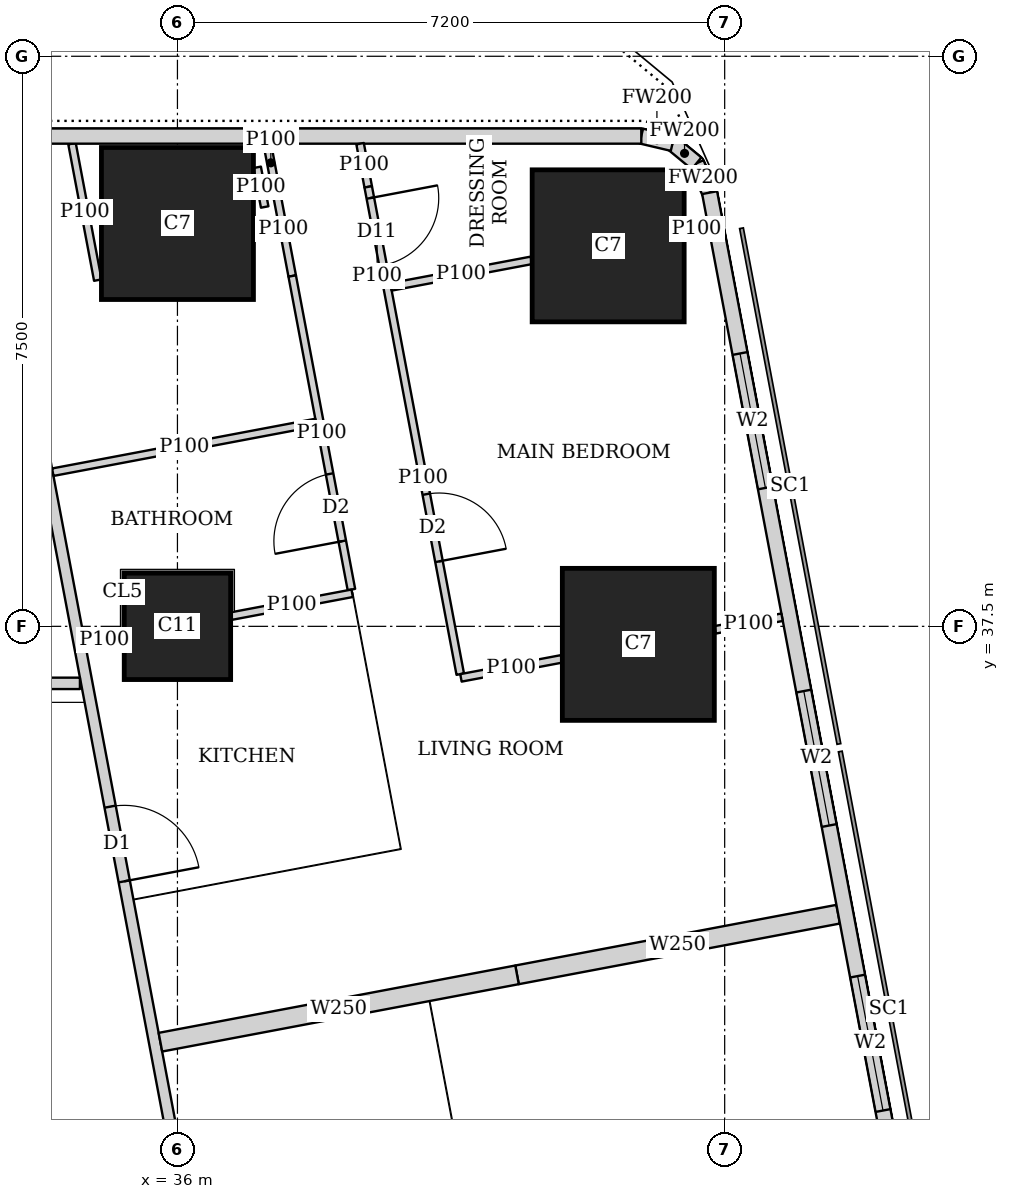
"""IFC4 building model, lengths in metres.
Left out: names, types, materials, properties, quantities, classifications, styles, units other than length and angle.
Written with IfcOpenShell. Run it as: python <this file> out.ifc"""

import sys

from ifc_helpers import new_model, si_unit, direction, frame, frame_2d, origin, origin_2d, place, context, subcontext, project, spatial, rectangle, extrude, element, fill, save


model = new_model("IFC4")
c1 = context("Model", 3, precision=1e-05, world=origin(), true_north=direction((0.0, 1.0)))
c2 = subcontext(c1, "Body", "Model", "MODEL_VIEW")
j1 = project(units=[si_unit("LENGTHUNIT", "METRE"), si_unit("PLANEANGLEUNIT", "RADIAN")], contexts=[c1])
p1 = place(None, origin())
s1 = spatial("IfcSite", under=j1, at=p1, CompositionType="ELEMENT")
p2 = place(p1, origin())
s2 = spatial("IfcBuilding", under=s1, at=p2, CompositionType="ELEMENT")
p3 = place(p2, frame((0.0, 0.0, 251.6)))
s3 = spatial("IfcBuildingStorey", under=s2, at=p3, CompositionType="ELEMENT", Elevation=251.6)
p4 = place(p3, frame((36.0, 37.5, 0.0), z_axis=(0.0, 0.0, 1.0), x_axis=(1.0, 0.0, 0.0)))
e1 = element("IfcColumn", 1, at=p4, inside=s3, PredefinedType="COLUMN", context=c2, shape_type="SweptSolid", body=[
    extrude(rectangle(XDim=1.4, YDim=1.4, at=origin_2d()), origin(), (0.0, 0.0, 1.0), 3.75),
])
p5 = place(p3, frame((42.064, 37.263, 0.0), z_axis=(0.0, 0.0, 1.0), x_axis=(1.0, 0.0, 0.0)))
e2 = element("IfcColumn", 2, at=p5, inside=s3, PredefinedType="COLUMN", context=c2, shape_type="SweptSolid", body=[
    extrude(rectangle(XDim=2.0, YDim=2.0, at=origin_2d()), origin(), (0.0, 0.0, 1.0), 3.75),
])
for number, where, z_axis, x_axis in (
    (3, (36.0, 42.8, -0.25), (0.0, 0.0, 1.0), (1.0, 0.0, 0.0)),
    (4, (41.667, 42.506, -0.25), (0.0, 0.0, 1.0), (1.0, 0.0, 0.0)),
):
    element("IfcColumn", number, at=place(p3, frame(where, z_axis=z_axis, x_axis=x_axis)), inside=s3, PredefinedType="COLUMN", context=c2, shape_type="SweptSolid", body=[
        extrude(rectangle(XDim=2.0, YDim=2.0, at=origin_2d()), origin(), (0.0, 0.0, 1.0), 4.0),
    ])
p6 = place(p3, frame((49.684, 7.832, 0.0), z_axis=(0.0, 0.0, 1.0), x_axis=(-0.185616669694, 0.982622232565, 0.0)))
e5 = element("IfcWall", 5, at=p6, inside=s3, PredefinedType="SOLIDWALL", context=c2, shape_type="SweptSolid", body=[
    extrude(rectangle(XDim=36.0, YDim=0.2, at=frame_2d((18.0, 0.0))), origin(), (0.0, 0.0, 1.0), 3.5),
])
p7 = place(p6, frame((2.518, 0.0, 0.9)))
e6 = element("IfcOpeningElement", 6, at=p7, cuts=e5, PredefinedType="OPENING", context=c2, shape_type="SweptSolid", body=[
    extrude(rectangle(XDim=2.4, YDim=1.5, at=frame_2d((1.2, 0.75))), frame((0.0, 0.11, 0.0), z_axis=(0.0, -1.0, 0.0), x_axis=(1.0, 0.0, 0.0)), (0.0, 0.0, 1.0), 0.22),
])
p8 = place(p6, frame((8.444, 0.0, 0.9)))
e7 = element("IfcOpeningElement", 7, at=p8, cuts=e5, PredefinedType="OPENING", context=c2, shape_type="SweptSolid", body=[
    extrude(rectangle(XDim=1.8, YDim=1.5, at=frame_2d((0.9, 0.75))), frame((0.0, 0.11, 0.0), z_axis=(0.0, -1.0, 0.0), x_axis=(1.0, 0.0, 0.0)), (0.0, 0.0, 1.0), 0.22),
])
p9 = place(p6, frame((12.261, 0.0, 0.9)))
e8 = element("IfcOpeningElement", 8, at=p9, cuts=e5, PredefinedType="OPENING", context=c2, shape_type="SweptSolid", body=[
    extrude(rectangle(XDim=1.8, YDim=1.5, at=frame_2d((0.9, 0.75))), frame((0.0, 0.11, 0.0), z_axis=(0.0, -1.0, 0.0), x_axis=(1.0, 0.0, 0.0)), (0.0, 0.0, 1.0), 0.22),
])
p10 = place(p6, frame((16.078, 0.0, 0.9)))
e9 = element("IfcOpeningElement", 9, at=p10, cuts=e5, PredefinedType="OPENING", context=c2, shape_type="SweptSolid", body=[
    extrude(rectangle(XDim=1.8, YDim=1.5, at=frame_2d((0.9, 0.75))), frame((0.0, 0.11, 0.0), z_axis=(0.0, -1.0, 0.0), x_axis=(1.0, 0.0, 0.0)), (0.0, 0.0, 1.0), 0.22),
])
p11 = place(p6, frame((19.894, 0.0, 0.9)))
e10 = element("IfcOpeningElement", 10, at=p11, cuts=e5, PredefinedType="OPENING", context=c2, shape_type="SweptSolid", body=[
    extrude(rectangle(XDim=1.8, YDim=1.5, at=frame_2d((0.9, 0.75))), frame((0.0, 0.11, 0.0), z_axis=(0.0, -1.0, 0.0), x_axis=(1.0, 0.0, 0.0)), (0.0, 0.0, 1.0), 0.22),
])
p12 = place(p6, frame((23.71, 0.0, 0.9)))
e11 = element("IfcOpeningElement", 11, at=p12, cuts=e5, PredefinedType="OPENING", context=c2, shape_type="SweptSolid", body=[
    extrude(rectangle(XDim=1.8, YDim=1.5, at=frame_2d((0.9, 0.75))), frame((0.0, 0.11, 0.0), z_axis=(0.0, -1.0, 0.0), x_axis=(1.0, 0.0, 0.0)), (0.0, 0.0, 1.0), 0.22),
])
p13 = place(p6, frame((27.526, 0.0, 0.9)))
e12 = element("IfcOpeningElement", 12, at=p13, cuts=e5, PredefinedType="OPENING", context=c2, shape_type="SweptSolid", body=[
    extrude(rectangle(XDim=1.8, YDim=1.5, at=frame_2d((0.9, 0.75))), frame((0.0, 0.11, 0.0), z_axis=(0.0, -1.0, 0.0), x_axis=(1.0, 0.0, 0.0)), (0.0, 0.0, 1.0), 0.22),
])
p14 = place(p6, frame((32.046, 0.0, 0.9)))
e13 = element("IfcOpeningElement", 13, at=p14, cuts=e5, PredefinedType="OPENING", context=c2, shape_type="SweptSolid", body=[
    extrude(rectangle(XDim=1.8, YDim=1.5, at=frame_2d((0.9, 0.75))), frame((0.0, 0.11, 0.0), z_axis=(0.0, -1.0, 0.0), x_axis=(1.0, 0.0, 0.0)), (0.0, 0.0, 1.0), 0.22),
])
p15 = place(p3, frame((43.002, 43.206, 0.0), z_axis=(0.0, 0.0, 1.0), x_axis=(-0.40678170573, 0.913525393124, 0.0)))
e14 = element("IfcWall", 14, at=p15, inside=s3, PredefinedType="SOLIDWALL", context=c2, shape_type="SweptSolid", body=[
    extrude(rectangle(XDim=0.423, YDim=0.2, at=frame_2d((0.211, 0.0))), origin(), (0.0, 0.0, 1.0), 3.5),
])
p16 = place(p3, frame((42.83, 43.592, 0.0), z_axis=(0.0, 0.0, 1.0), x_axis=(-0.771190539797, 0.636604391539, 0.0)))
e15 = element("IfcWall", 15, at=p16, inside=s3, PredefinedType="SOLIDWALL", context=c2, shape_type="SweptSolid", body=[
    extrude(rectangle(XDim=0.41, YDim=0.2, at=frame_2d((0.205, 0.0))), origin(), (0.0, 0.0, 1.0), 3.5),
])
p17 = place(p3, frame((42.514, 43.853, 0.0), z_axis=(0.0, 0.0, 1.0), x_axis=(-0.973288080424, 0.229587265555, 0.0)))
e16 = element("IfcWall", 16, at=p17, inside=s3, PredefinedType="SOLIDWALL", context=c2, shape_type="SweptSolid", body=[
    extrude(rectangle(XDim=0.422, YDim=0.2, at=frame_2d((0.211, 0.0))), origin(), (0.0, 0.0, 1.0), 3.5),
])
p18 = place(p3, frame((42.103, 43.95, 0.0), z_axis=(0.0, 0.0, 1.0), x_axis=(-1.0, 0.0, 0.0)))
e17 = element("IfcWall", 17, at=p18, inside=s3, PredefinedType="SOLIDWALL", context=c2, shape_type="SweptSolid", body=[
    extrude(rectangle(XDim=27.54, YDim=0.2, at=frame_2d((13.77, 0.0))), origin(), (0.0, 0.0, 1.0), 3.5),
])
p19 = place(p18, frame((10.603, 0.0, 0.9)))
e18 = element("IfcOpeningElement", 18, at=p19, cuts=e17, PredefinedType="OPENING", context=c2, shape_type="SweptSolid", body=[
    extrude(rectangle(XDim=1.8, YDim=1.5, at=frame_2d((0.9, 0.75))), frame((0.0, 0.11, 0.0), z_axis=(0.0, -1.0, 0.0), x_axis=(1.0, 0.0, 0.0)), (0.0, 0.0, 1.0), 0.22),
])
p20 = place(p18, frame((14.203, 0.0, 0.9)))
e19 = element("IfcOpeningElement", 19, at=p20, cuts=e17, PredefinedType="OPENING", context=c2, shape_type="SweptSolid", body=[
    extrude(rectangle(XDim=1.8, YDim=1.5, at=frame_2d((0.9, 0.75))), frame((0.0, 0.11, 0.0), z_axis=(0.0, -1.0, 0.0), x_axis=(1.0, 0.0, 0.0)), (0.0, 0.0, 1.0), 0.22),
])
p21 = place(p18, frame((17.803, 0.0, 0.9)))
e20 = element("IfcOpeningElement", 20, at=p21, cuts=e17, PredefinedType="OPENING", context=c2, shape_type="SweptSolid", body=[
    extrude(rectangle(XDim=1.8, YDim=1.5, at=frame_2d((0.9, 0.75))), frame((0.0, 0.11, 0.0), z_axis=(0.0, -1.0, 0.0), x_axis=(1.0, 0.0, 0.0)), (0.0, 0.0, 1.0), 0.22),
])
p22 = place(p18, frame((22.822, 0.0, 0.9)))
e21 = element("IfcOpeningElement", 21, at=p22, cuts=e17, PredefinedType="OPENING", context=c2, shape_type="SweptSolid", body=[
    extrude(rectangle(XDim=2.4, YDim=1.5, at=frame_2d((1.2, 0.75))), frame((0.0, 0.11, 0.0), z_axis=(0.0, -1.0, 0.0), x_axis=(1.0, 0.0, 0.0)), (0.0, 0.0, 1.0), 0.22),
])
p23 = place(p3, frame((29.501, 36.75, 0.0), z_axis=(0.0, 0.0, 1.0), x_axis=(1.0, 0.0, 0.0)))
e22 = element("IfcWall", 22, at=p23, inside=s3, PredefinedType="SOLIDWALL", context=c2, shape_type="SweptSolid", body=[
    extrude(rectangle(XDim=5.216, YDim=0.15, at=frame_2d((2.608, 0.0))), origin(), (0.0, 0.0, 1.0), 3.5),
])
p24 = place(p23, frame((1.803, 0.0, 0.0)))
e23 = element("IfcOpeningElement", 23, at=p24, cuts=e22, PredefinedType="OPENING", context=c2, shape_type="SweptSolid", body=[
    extrude(rectangle(XDim=1.0, YDim=2.1, at=frame_2d((0.5, 1.05))), frame((0.0, 0.085, 0.0), z_axis=(0.0, -1.0, 0.0), x_axis=(1.0, 0.0, 0.0)), (0.0, 0.0, 1.0), 0.17),
])
p25 = place(p3, frame((33.781, 42.186, 0.0), z_axis=(0.0, 0.0, 1.0), x_axis=(0.185593518645, -0.9826266055, 0.0)))
e24 = element("IfcWall", 24, at=p25, inside=s3, PredefinedType="SOLIDWALL", context=c2, shape_type="SweptSolid", body=[
    extrude(rectangle(XDim=35.961, YDim=0.15, at=frame_2d((17.98, 0.0))), origin(), (0.0, 0.0, 1.0), 2.5),
])
p26 = place(p25, frame((7.183, 0.0, 0.0)))
e25 = element("IfcOpeningElement", 25, at=p26, cuts=e24, PredefinedType="OPENING", context=c2, shape_type="SweptSolid", body=[
    extrude(rectangle(XDim=1.0, YDim=2.1, at=frame_2d((0.5, 1.05))), frame((0.0, 0.085, 0.0), z_axis=(0.0, -1.0, 0.0), x_axis=(1.0, 0.0, 0.0)), (0.0, 0.0, 1.0), 0.17),
])
p27 = place(p25, frame((11.76, 0.0, 0.0)))
e26 = element("IfcOpeningElement", 26, at=p27, cuts=e24, PredefinedType="OPENING", context=c2, shape_type="SweptSolid", body=[
    extrude(rectangle(XDim=1.0, YDim=2.1, at=frame_2d((0.5, 1.05))), frame((0.0, 0.085, 0.0), z_axis=(0.0, -1.0, 0.0), x_axis=(1.0, 0.0, 0.0)), (0.0, 0.0, 1.0), 0.17),
])
p28 = place(p25, frame((23.863, 0.0, 0.0)))
e27 = element("IfcOpeningElement", 27, at=p28, cuts=e24, PredefinedType="OPENING", context=c2, shape_type="SweptSolid", body=[
    extrude(rectangle(XDim=1.0, YDim=2.1, at=frame_2d((0.5, 1.05))), frame((0.0, 0.085, 0.0), z_axis=(0.0, -1.0, 0.0), x_axis=(1.0, 0.0, 0.0)), (0.0, 0.0, 1.0), 0.17),
])
p29 = place(p25, frame((30.502, 0.0, 0.0)))
e28 = element("IfcOpeningElement", 28, at=p29, cuts=e24, PredefinedType="OPENING", context=c2, shape_type="SweptSolid", body=[
    extrude(rectangle(XDim=1.0, YDim=2.1, at=frame_2d((0.5, 1.05))), frame((0.0, 0.085, 0.0), z_axis=(0.0, -1.0, 0.0), x_axis=(1.0, 0.0, 0.0)), (0.0, 0.0, 1.0), 0.17),
])
p30 = place(p3, frame((34.952, 42.055, 0.0), z_axis=(0.0, 0.0, 1.0), x_axis=(-0.185490642006, 0.98264603074, 0.0)))
e29 = element("IfcWall", 29, at=p30, inside=s3, PredefinedType="PARTITIONING", context=c2, shape_type="SweptSolid", body=[
    extrude(rectangle(XDim=1.827, YDim=0.1, at=frame_2d((0.914, 0.0))), origin(), (0.0, 0.0, 1.0), 2.05),
])
p31 = place(p3, frame((37.049, 43.539, 0.0), z_axis=(0.0, 0.0, 1.0), x_axis=(0.186119495745, -0.982527115811, 0.0)))
e30 = element("IfcWall", 30, at=p31, inside=s3, PredefinedType="PARTITIONING", context=c2, shape_type="SweptSolid", body=[
    extrude(rectangle(XDim=0.531, YDim=0.1, at=frame_2d((0.266, 0.0))), origin(), (0.0, 0.0, 1.0), 2.05),
])
p32 = place(p3, frame((38.403, 43.85, 0.0), z_axis=(0.0, 0.0, 1.0), x_axis=(0.184976954078, -0.982742858768, 0.0)))
e31 = element("IfcWall", 31, at=p32, inside=s3, PredefinedType="PARTITIONING", context=c2, shape_type="SweptSolid", body=[
    extrude(rectangle(XDim=0.578, YDim=0.1, at=frame_2d((0.289, 0.0))), origin(), (0.0, 0.0, 1.0), 3.5),
])
p33 = place(p3, frame((38.51, 43.282, 0.0), z_axis=(0.0, 0.0, 1.0), x_axis=(0.185775287495, -0.982592256511, 0.0)))
e32 = element("IfcWall", 32, at=p33, inside=s3, PredefinedType="PARTITIONING", context=c2, shape_type="SweptSolid", body=[
    extrude(rectangle(XDim=1.259, YDim=0.1, at=frame_2d((0.629, 0.0))), origin(), (0.0, 0.0, 1.0), 2.05),
])
p34 = place(p33, frame((0.15, 0.0, 0.0)))
e33 = element("IfcOpeningElement", 33, at=p34, cuts=e32, PredefinedType="OPENING", context=c2, shape_type="SweptSolid", body=[
    extrude(rectangle(XDim=0.9, YDim=2.0, at=frame_2d((0.45, 1.0))), frame((0.0, 0.06, 0.0), z_axis=(0.0, -1.0, 0.0), x_axis=(1.0, 0.0, 0.0)), (0.0, 0.0, 1.0), 0.12),
])
p35 = place(p3, frame((38.744, 42.045, 0.0), z_axis=(0.0, 0.0, 1.0), x_axis=(0.185564988614, -0.982631993679, 0.0)))
e34 = element("IfcWall", 34, at=p35, inside=s3, PredefinedType="PARTITIONING", context=c2, shape_type="SweptSolid", body=[
    extrude(rectangle(XDim=5.265, YDim=0.1, at=frame_2d((2.633, 0.0))), origin(), (0.0, 0.0, 1.0), 3.5),
])
p36 = place(p35, frame((2.856, 0.0, 0.0)))
e35 = element("IfcOpeningElement", 35, at=p36, cuts=e34, PredefinedType="OPENING", context=c2, shape_type="SweptSolid", body=[
    extrude(rectangle(XDim=0.9, YDim=2.1, at=frame_2d((0.45, 1.05))), frame((0.0, 0.06, 0.0), z_axis=(0.0, -1.0, 0.0), x_axis=(1.0, 0.0, 0.0)), (0.0, 0.0, 1.0), 0.12),
])
p37 = place(p3, frame((37.181, 43.85, 0.0), z_axis=(0.0, 0.0, 1.0), x_axis=(0.185121727606, -0.982715597703, 0.0)))
e36 = element("IfcWall", 36, at=p37, inside=s3, PredefinedType="PARTITIONING", context=c2, shape_type="SweptSolid", body=[
    extrude(rectangle(XDim=0.513, YDim=0.1, at=frame_2d((0.256, 0.0))), origin(), (0.0, 0.0, 1.0), 3.5),
])
p38 = place(p3, frame((37.276, 43.346, 0.0), z_axis=(0.0, 0.0, 1.0), x_axis=(0.185962504646, -0.982556841544, 0.0)))
e37 = element("IfcWall", 37, at=p38, inside=s3, PredefinedType="PARTITIONING", context=c2, shape_type="SweptSolid", body=[
    extrude(rectangle(XDim=1.259, YDim=0.1, at=frame_2d((0.629, 0.0))), origin(), (0.0, 0.0, 1.0), 2.05),
])
p39 = place(p3, frame((37.51, 42.109, 0.0), z_axis=(0.0, 0.0, 1.0), x_axis=(0.185580569503, -0.98262905118, 0.0)))
e38 = element("IfcWall", 38, at=p39, inside=s3, PredefinedType="PARTITIONING", context=c2, shape_type="SweptSolid", body=[
    extrude(rectangle(XDim=4.198, YDim=0.1, at=frame_2d((2.099, 0.0))), origin(), (0.0, 0.0, 1.0), 3.5),
])
p40 = place(p39, frame((2.65, 0.0, 0.0)))
e39 = element("IfcOpeningElement", 39, at=p40, cuts=e38, PredefinedType="OPENING", context=c2, shape_type="SweptSolid", body=[
    extrude(rectangle(XDim=0.9, YDim=2.1, at=frame_2d((0.45, 1.05))), frame((0.0, 0.06, 0.0), z_axis=(0.0, -1.0, 0.0), x_axis=(1.0, 0.0, 0.0)), (0.0, 0.0, 1.0), 0.12),
])
p41 = place(p3, frame((42.985, 42.755, 0.0), z_axis=(0.0, 0.0, 1.0), x_axis=(-0.98281924824, -0.184570651215, 0.0)))
e40 = element("IfcWall", 40, at=p41, inside=s3, PredefinedType="PARTITIONING", context=c2, shape_type="SweptSolid", body=[
    extrude(rectangle(XDim=0.313, YDim=0.1, at=frame_2d((0.157, 0.0))), origin(), (0.0, 0.0, 1.0), 3.5),
])
p42 = place(p3, frame((40.657, 42.315, 0.0), z_axis=(0.0, 0.0, 1.0), x_axis=(-0.982622785543, -0.185613742305, 0.0)))
e41 = element("IfcWall", 41, at=p42, inside=s3, PredefinedType="PARTITIONING", context=c2, shape_type="SweptSolid", body=[
    extrude(rectangle(XDim=1.88, YDim=0.1, at=frame_2d((0.94, 0.0))), origin(), (0.0, 0.0, 1.0), 2.05),
])
p43 = place(p3, frame((43.955, 37.62, 0.0), z_axis=(0.0, 0.0, 1.0), x_axis=(-0.982708424405, -0.18515980288, 0.0)))
e42 = element("IfcWall", 42, at=p43, inside=s3, PredefinedType="PARTITIONING", context=c2, shape_type="SweptSolid", body=[
    extrude(rectangle(XDim=0.897, YDim=0.1, at=frame_2d((0.448, 0.0))), origin(), (0.0, 0.0, 1.0), 3.5),
])
p44 = place(p3, frame((41.054, 37.072, 0.0), z_axis=(0.0, 0.0, 1.0), x_axis=(-0.982635482721, -0.18554651195, 0.0)))
e43 = element("IfcWall", 43, at=p44, inside=s3, PredefinedType="PARTITIONING", context=c2, shape_type="SweptSolid", body=[
    extrude(rectangle(XDim=1.347, YDim=0.1, at=frame_2d((0.674, 0.0))), origin(), (0.0, 0.0, 1.0), 3.5),
])
p45 = place(p3, frame((37.823, 40.182, 0.0), z_axis=(0.0, 0.0, 1.0), x_axis=(-0.98263926043, -0.185526504472, 0.0)))
e44 = element("IfcWall", 44, at=p45, inside=s3, PredefinedType="PARTITIONING", context=c2, shape_type="SweptSolid", body=[
    extrude(rectangle(XDim=3.524, YDim=0.1, at=frame_2d((1.762, 0.0))), origin(), (0.0, 0.0, 1.0), 3.5),
])
p46 = place(p3, frame((38.299, 37.935, 0.0), z_axis=(0.0, 0.0, 1.0), x_axis=(-0.98263725405, -0.185537130931, 0.0)))
e45 = element("IfcWall", 45, at=p46, inside=s3, PredefinedType="PARTITIONING", context=c2, shape_type="SweptSolid", body=[
    extrude(rectangle(XDim=1.617, YDim=0.1, at=frame_2d((0.809, 0.0))), origin(), (0.0, 0.0, 1.0), 3.5),
])
p47 = place(p3, frame((35.29, 37.366, 0.0), z_axis=(0.0, 0.0, 1.0), x_axis=(-0.982715597703, -0.185121727606, 0.0)))
e46 = element("IfcWall", 46, at=p47, inside=s3, PredefinedType="PARTITIONING", context=c2, shape_type="SweptSolid", body=[
    extrude(rectangle(XDim=0.513, YDim=0.1, at=frame_2d((0.256, 0.0))), origin(), (0.0, 0.0, 1.0), 3.5),
])
p48 = place(p3, frame((44.693, 33.713, 0.0), z_axis=(0.0, 0.0, 1.0), x_axis=(-0.982633535512, -0.185556823879, 0.0)))
e47 = element("IfcWall", 47, at=p48, inside=s3, PredefinedType="SOLIDWALL", context=c2, shape_type="SweptSolid", body=[
    extrude(rectangle(XDim=4.3, YDim=0.25, at=frame_2d((2.15, 0.0))), origin(), (0.0, 0.0, 1.0), 2.5),
])
p49 = place(p3, frame((40.468, 32.915, 0.0), z_axis=(0.0, 0.0, 1.0), x_axis=(-0.982635807605, -0.185544791394, 0.0)))
e48 = element("IfcWall", 48, at=p49, inside=s3, PredefinedType="SOLIDWALL", context=c2, shape_type="SweptSolid", body=[
    extrude(rectangle(XDim=4.775, YDim=0.25, at=frame_2d((2.388, 0.0))), origin(), (0.0, 0.0, 1.0), 3.5),
])
p50 = place(p12, origin())
e49 = element("IfcWindow", 49, at=p50, inside=s3, PartitioningType="SINGLE_PANEL", PredefinedType="WINDOW", context=c2, shape_type="SweptSolid", body=[
    extrude(rectangle(XDim=1.8, YDim=1.5, at=frame_2d((0.9, 0.75))), frame((0.0, 0.03, 0.0), z_axis=(0.0, -1.0, 0.0), x_axis=(1.0, 0.0, 0.0)), (0.0, 0.0, 1.0), 0.06),
])
fill(e11, e49)
p51 = place(p13, origin())
e50 = element("IfcWindow", 50, at=p51, inside=s3, PartitioningType="SINGLE_PANEL", PredefinedType="WINDOW", context=c2, shape_type="SweptSolid", body=[
    extrude(rectangle(XDim=1.8, YDim=1.5, at=frame_2d((0.9, 0.75))), frame((0.0, 0.03, 0.0), z_axis=(0.0, -1.0, 0.0), x_axis=(1.0, 0.0, 0.0)), (0.0, 0.0, 1.0), 0.06),
])
fill(e12, e50)
p52 = place(p14, origin())
e51 = element("IfcWindow", 51, at=p52, inside=s3, PartitioningType="SINGLE_PANEL", PredefinedType="WINDOW", context=c2, shape_type="SweptSolid", body=[
    extrude(rectangle(XDim=1.8, YDim=1.5, at=frame_2d((0.9, 0.75))), frame((0.0, 0.03, 0.0), z_axis=(0.0, -1.0, 0.0), x_axis=(1.0, 0.0, 0.0)), (0.0, 0.0, 1.0), 0.06),
])
fill(e13, e51)
p53 = place(p34, origin())
e52 = element("IfcDoor", 52, at=p53, inside=s3, OperationType="SINGLE_SWING_LEFT", PredefinedType="DOOR", context=c2, shape_type="SweptSolid", body=[
    extrude(rectangle(XDim=0.9, YDim=2.0, at=frame_2d((0.45, 1.0))), frame((0.0, 0.025, 0.0), z_axis=(0.0, -1.0, 0.0), x_axis=(1.0, 0.0, 0.0)), (0.0, 0.0, 1.0), 0.05),
])
fill(e33, e52)
p54 = place(p36, origin())
e53 = element("IfcDoor", 53, at=p54, inside=s3, OperationType="SINGLE_SWING_RIGHT", PredefinedType="DOOR", context=c2, shape_type="SweptSolid", body=[
    extrude(rectangle(XDim=0.9, YDim=2.1, at=frame_2d((0.45, 1.05))), frame((0.0, 0.025, 0.0), z_axis=(0.0, -1.0, 0.0), x_axis=(1.0, 0.0, 0.0)), (0.0, 0.0, 1.0), 0.05),
])
fill(e35, e53)
p55 = place(p40, origin())
e54 = element("IfcDoor", 54, at=p55, inside=s3, OperationType="SINGLE_SWING_LEFT", PredefinedType="DOOR", context=c2, shape_type="SweptSolid", body=[
    extrude(rectangle(XDim=0.9, YDim=2.1, at=frame_2d((0.45, 1.05))), frame((0.0, 0.025, 0.0), z_axis=(0.0, -1.0, 0.0), x_axis=(1.0, 0.0, 0.0)), (0.0, 0.0, 1.0), 0.05),
])
fill(e39, e54)
p56 = place(p26, origin())
e55 = element("IfcDoor", 55, at=p56, inside=s3, OperationType="SINGLE_SWING_RIGHT", PredefinedType="DOOR", context=c2, shape_type="SweptSolid", body=[
    extrude(rectangle(XDim=1.0, YDim=2.1, at=frame_2d((0.5, 1.05))), frame((0.0, 0.025, 0.0), z_axis=(0.0, -1.0, 0.0), x_axis=(1.0, 0.0, 0.0)), (0.0, 0.0, 1.0), 0.05),
])
fill(e25, e55)
save(model, sys.argv[1])
